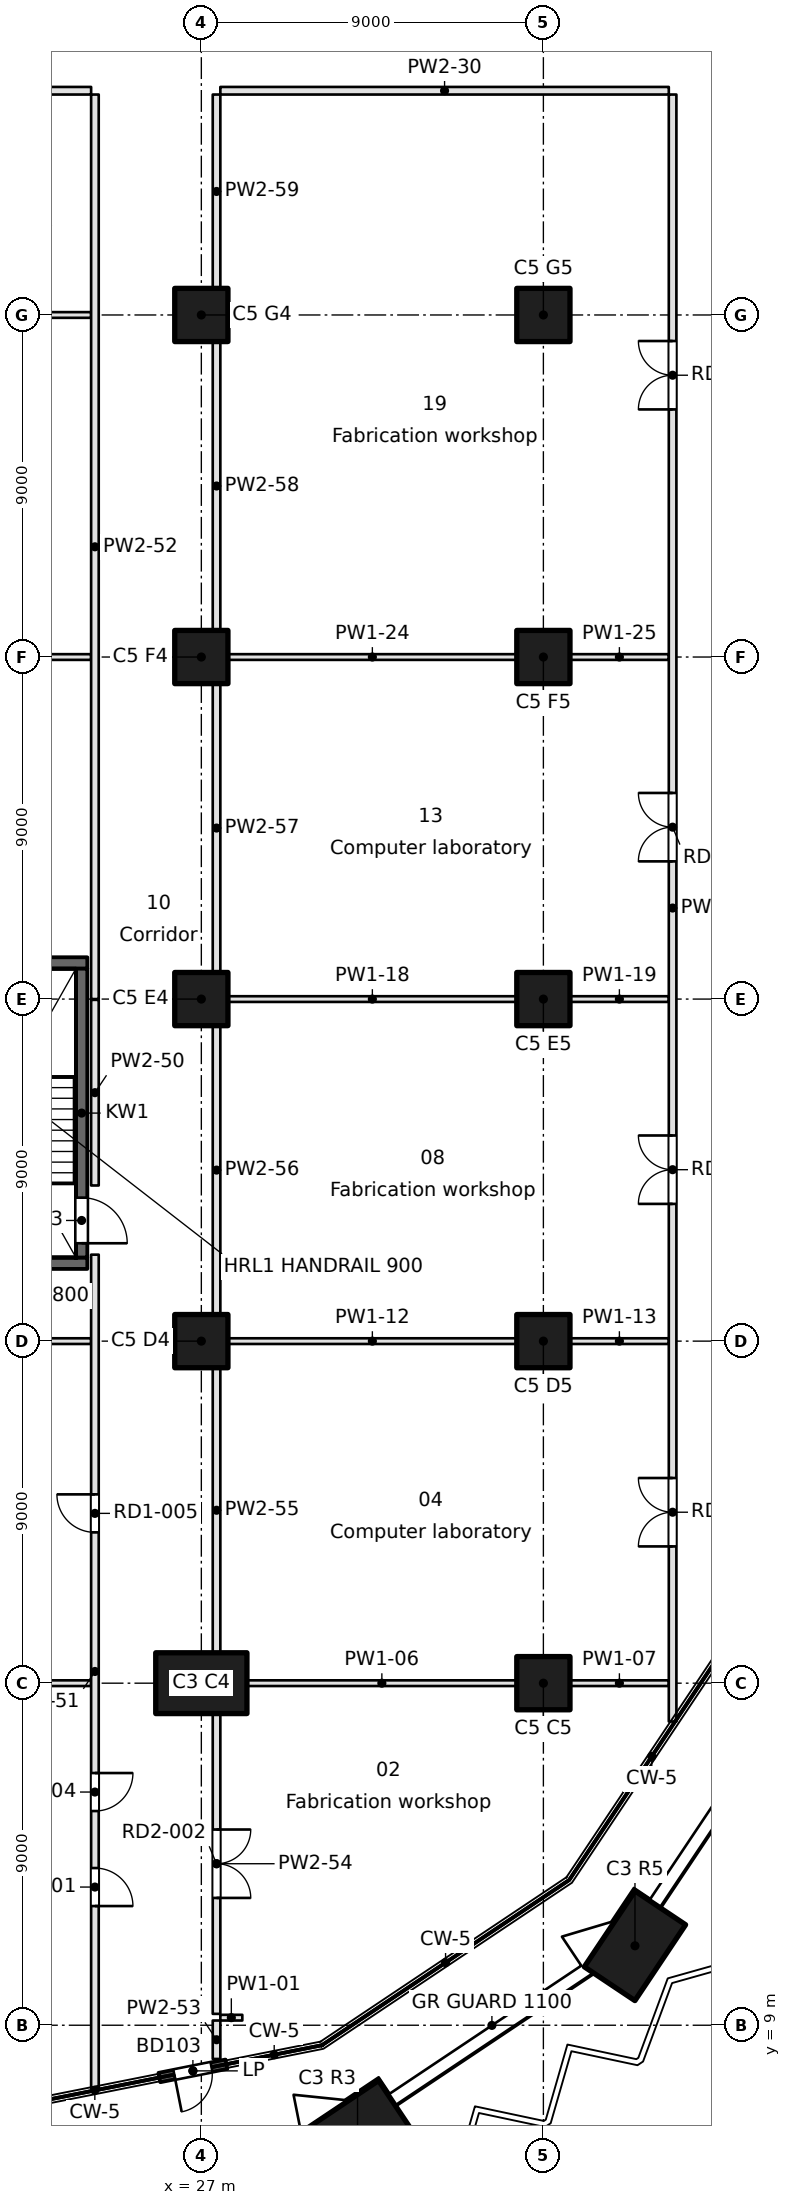
"""IFC4 building model, lengths in metres.
Left out: names, types, materials, properties, quantities, classifications, styles, units other than length and angle.
Written with IfcOpenShell. Run it as: python <this file> out.ifc"""

import sys

from ifc_helpers import new_model, si_unit, direction, frame, frame_2d, origin, origin_2d, place, context, subcontext, project, spatial, rectangle, extrude, element, fill, save


model = new_model("IFC4")
c1 = context("Model", 3, precision=1e-05, world=origin(), true_north=direction((0.0, 1.0)))
c2 = subcontext(c1, "Body", "Model", "MODEL_VIEW")
j1 = project(units=[si_unit("LENGTHUNIT", "METRE"), si_unit("PLANEANGLEUNIT", "RADIAN")], contexts=[c1])
p1 = place(None, origin())
s1 = spatial("IfcSite", under=j1, at=p1, CompositionType="ELEMENT")
p2 = place(p1, origin())
s2 = spatial("IfcBuilding", under=s1, at=p2, CompositionType="ELEMENT")
p3 = place(p2, frame((0.0, 0.0, 72.8)))
s3 = spatial("IfcBuildingStorey", under=s2, at=p3, CompositionType="ELEMENT", Elevation=72.8)
for number, where, z_axis, x_axis in (
    (1, (31.11, 6.213, 0.0), (0.0, 0.0, 1.0), (0.831, 0.556, 0.0)),
    (2, (38.41, 11.09, 0.0), (0.0, 0.0, 1.0), (0.556, 0.831, 0.0)),
    (3, (27.0, 18.0, 0.0), (0.0, 0.0, 1.0), (1.0, 0.0, 0.0)),
):
    element("IfcColumn", number, at=place(p3, frame(where, z_axis=z_axis, x_axis=x_axis)), inside=s3, PredefinedType="COLUMN", context=c2, shape_type="SweptSolid", body=[
        extrude(rectangle(XDim=2.4, YDim=1.6, at=origin_2d()), origin(), (0.0, 0.0, 1.0), 3.7),
    ])
for number, where, z_axis, x_axis in (
    (4, (27.0, 27.0, 0.0), (0.0, 0.0, 1.0), (1.0, 0.0, 0.0)),
    (5, (27.0, 36.0, 0.0), (0.0, 0.0, 1.0), (1.0, 0.0, 0.0)),
    (6, (27.0, 45.0, 0.0), (0.0, 0.0, 1.0), (1.0, 0.0, 0.0)),
    (7, (27.0, 54.0, 0.0), (0.0, 0.0, 1.0), (1.0, 0.0, 0.0)),
    (8, (36.0, 18.0, 0.0), (0.0, 0.0, 1.0), (1.0, 0.0, 0.0)),
    (9, (36.0, 27.0, 0.0), (0.0, 0.0, 1.0), (1.0, 0.0, 0.0)),
    (10, (36.0, 36.0, 0.0), (0.0, 0.0, 1.0), (1.0, 0.0, 0.0)),
    (11, (36.0, 45.0, 0.0), (0.0, 0.0, 1.0), (1.0, 0.0, 0.0)),
    (12, (36.0, 54.0, 0.0), (0.0, 0.0, 1.0), (1.0, 0.0, 0.0)),
):
    element("IfcColumn", number, at=place(p3, frame(where, z_axis=z_axis, x_axis=x_axis)), inside=s3, PredefinedType="COLUMN", context=c2, shape_type="SweptSolid", body=[
        extrude(rectangle(XDim=1.4, YDim=1.4, at=origin_2d()), origin(), (0.0, 0.0, 1.0), 3.7),
    ])
p4 = place(p3, frame((25.896, 7.624, 0.0), z_axis=(0.0, 0.0, 1.0), x_axis=(0.980793982239, 0.195046569833, 0.0)))
e13 = element("IfcWall", 13, at=p4, inside=s3, PredefinedType="SOLIDWALL", context=c2, shape_type="SweptSolid", body=[
    extrude(rectangle(XDim=1.8, YDim=0.25, at=frame_2d((0.9, 0.0))), origin(), (0.0, 0.0, 1.0), 3.3),
])
p5 = place(p4, frame((0.4, 0.0, 0.0)))
e14 = element("IfcOpeningElement", 14, at=p5, cuts=e13, PredefinedType="OPENING", context=c2, shape_type="SweptSolid", body=[
    extrude(rectangle(XDim=1.0, YDim=2.1, at=frame_2d((0.5, 1.05))), frame((0.0, 0.125, 0.0), z_axis=(0.0, -1.0, 0.0), x_axis=(1.0, 0.0, 0.0)), (0.0, 0.0, 1.0), 0.25),
])
for number, where, z_axis, x_axis in (
    (15, (19.1, 29.05, -0.4), (0.0, 0.0, 1.0), (1.0, 0.0, 0.0)),
    (16, (19.1, 36.95, -0.4), (0.0, 0.0, 1.0), (1.0, 0.0, 0.0)),
):
    element("IfcWall", number, at=place(p3, frame(where, z_axis=z_axis, x_axis=x_axis)), inside=s3, PredefinedType="SOLIDWALL", context=c2, shape_type="SweptSolid", body=[
        extrude(rectangle(XDim=4.9, YDim=0.3, at=frame_2d((2.45, 0.0))), origin(), (0.0, 0.0, 1.0), 3.7),
    ])
p6 = place(p3, frame((23.85, 29.2, -0.4), z_axis=(0.0, 0.0, 1.0), x_axis=(0.0, 1.0, 0.0)))
e17 = element("IfcWall", 17, at=p6, inside=s3, PredefinedType="SOLIDWALL", context=c2, shape_type="SweptSolid", body=[
    extrude(rectangle(XDim=7.6, YDim=0.3, at=frame_2d((3.8, 0.0))), origin(), (0.0, 0.0, 1.0), 3.7),
])
p7 = place(p6, frame((0.375, 0.0, 0.4)))
e18 = element("IfcOpeningElement", 18, at=p7, cuts=e17, PredefinedType="OPENING", context=c2, shape_type="SweptSolid", body=[
    extrude(rectangle(XDim=1.2, YDim=2.1, at=frame_2d((0.6, 1.05))), frame((0.0, 0.15, 0.0), z_axis=(0.0, -1.0, 0.0), x_axis=(1.0, 0.0, 0.0)), (0.0, 0.0, 1.0), 0.3),
])
p8 = place(p3, frame((27.5, 9.199, 0.0), z_axis=(0.0, 0.0, 1.0), x_axis=(1.0, 0.0, 0.0)))
e19 = element("IfcWall", 19, at=p8, inside=s3, PredefinedType="PARTITIONING", context=c2, shape_type="SweptSolid", body=[
    extrude(rectangle(XDim=0.578, YDim=0.15, at=frame_2d((0.289, 0.0))), origin(), (0.0, 0.0, 1.0), 3.3),
])
p9 = place(p3, frame((18.7, 18.0, 0.0), z_axis=(0.0, 0.0, 1.0), x_axis=(1.0, 0.0, 0.0)))
e20 = element("IfcWall", 20, at=p9, inside=s3, PredefinedType="PARTITIONING", context=c2, shape_type="SweptSolid", body=[
    extrude(rectangle(XDim=5.4, YDim=0.15, at=frame_2d((2.7, 0.0))), origin(), (0.0, 0.0, 1.0), 3.3),
])
p10 = place(p3, frame((28.2, 18.0, 0.0), z_axis=(0.0, 0.0, 1.0), x_axis=(1.0, 0.0, 0.0)))
e21 = element("IfcWall", 21, at=p10, inside=s3, PredefinedType="PARTITIONING", context=c2, shape_type="SweptSolid", body=[
    extrude(rectangle(XDim=7.1, YDim=0.15, at=frame_2d((3.55, 0.0))), origin(), (0.0, 0.0, 1.0), 3.3),
])
p11 = place(p3, frame((36.7, 18.0, 0.0), z_axis=(0.0, 0.0, 1.0), x_axis=(1.0, 0.0, 0.0)))
e22 = element("IfcWall", 22, at=p11, inside=s3, PredefinedType="PARTITIONING", context=c2, shape_type="SweptSolid", body=[
    extrude(rectangle(XDim=2.6, YDim=0.15, at=frame_2d((1.3, 0.0))), origin(), (0.0, 0.0, 1.0), 3.3),
])
p12 = place(p3, frame((18.7, 27.0, 0.0), z_axis=(0.0, 0.0, 1.0), x_axis=(1.0, 0.0, 0.0)))
e23 = element("IfcWall", 23, at=p12, inside=s3, PredefinedType="PARTITIONING", context=c2, shape_type="SweptSolid", body=[
    extrude(rectangle(XDim=5.4, YDim=0.15, at=frame_2d((2.7, 0.0))), origin(), (0.0, 0.0, 1.0), 3.3),
])
p13 = place(p3, frame((27.7, 27.0, 0.0), z_axis=(0.0, 0.0, 1.0), x_axis=(1.0, 0.0, 0.0)))
e24 = element("IfcWall", 24, at=p13, inside=s3, PredefinedType="PARTITIONING", context=c2, shape_type="SweptSolid", body=[
    extrude(rectangle(XDim=7.6, YDim=0.15, at=frame_2d((3.8, 0.0))), origin(), (0.0, 0.0, 1.0), 3.3),
])
p14 = place(p3, frame((36.7, 27.0, 0.0), z_axis=(0.0, 0.0, 1.0), x_axis=(1.0, 0.0, 0.0)))
e25 = element("IfcWall", 25, at=p14, inside=s3, PredefinedType="PARTITIONING", context=c2, shape_type="SweptSolid", body=[
    extrude(rectangle(XDim=2.6, YDim=0.15, at=frame_2d((1.3, 0.0))), origin(), (0.0, 0.0, 1.0), 3.3),
])
p15 = place(p3, frame((27.7, 36.0, 0.0), z_axis=(0.0, 0.0, 1.0), x_axis=(1.0, 0.0, 0.0)))
e26 = element("IfcWall", 26, at=p15, inside=s3, PredefinedType="PARTITIONING", context=c2, shape_type="SweptSolid", body=[
    extrude(rectangle(XDim=7.6, YDim=0.15, at=frame_2d((3.8, 0.0))), origin(), (0.0, 0.0, 1.0), 3.3),
])
p16 = place(p3, frame((36.7, 36.0, 0.0), z_axis=(0.0, 0.0, 1.0), x_axis=(1.0, 0.0, 0.0)))
e27 = element("IfcWall", 27, at=p16, inside=s3, PredefinedType="PARTITIONING", context=c2, shape_type="SweptSolid", body=[
    extrude(rectangle(XDim=2.6, YDim=0.15, at=frame_2d((1.3, 0.0))), origin(), (0.0, 0.0, 1.0), 3.3),
])
p17 = place(p3, frame((18.7, 45.0, 0.0), z_axis=(0.0, 0.0, 1.0), x_axis=(1.0, 0.0, 0.0)))
e28 = element("IfcWall", 28, at=p17, inside=s3, PredefinedType="PARTITIONING", context=c2, shape_type="SweptSolid", body=[
    extrude(rectangle(XDim=5.4, YDim=0.15, at=frame_2d((2.7, 0.0))), origin(), (0.0, 0.0, 1.0), 3.3),
])
p18 = place(p3, frame((27.7, 45.0, 0.0), z_axis=(0.0, 0.0, 1.0), x_axis=(1.0, 0.0, 0.0)))
e29 = element("IfcWall", 29, at=p18, inside=s3, PredefinedType="PARTITIONING", context=c2, shape_type="SweptSolid", body=[
    extrude(rectangle(XDim=7.6, YDim=0.15, at=frame_2d((3.8, 0.0))), origin(), (0.0, 0.0, 1.0), 3.3),
])
p19 = place(p3, frame((36.7, 45.0, 0.0), z_axis=(0.0, 0.0, 1.0), x_axis=(1.0, 0.0, 0.0)))
e30 = element("IfcWall", 30, at=p19, inside=s3, PredefinedType="PARTITIONING", context=c2, shape_type="SweptSolid", body=[
    extrude(rectangle(XDim=2.6, YDim=0.15, at=frame_2d((1.3, 0.0))), origin(), (0.0, 0.0, 1.0), 3.3),
])
p20 = place(p3, frame((18.7, 54.0, 0.0), z_axis=(0.0, 0.0, 1.0), x_axis=(1.0, 0.0, 0.0)))
e31 = element("IfcWall", 31, at=p20, inside=s3, PredefinedType="PARTITIONING", context=c2, shape_type="SweptSolid", body=[
    extrude(rectangle(XDim=5.4, YDim=0.15, at=frame_2d((2.7, 0.0))), origin(), (0.0, 0.0, 1.0), 3.3),
])
p21 = place(p3, frame((24.1, 59.9, 0.0), z_axis=(0.0, 0.0, 1.0), x_axis=(-1.0, 0.0, 0.0)))
e32 = element("IfcWall", 32, at=p21, inside=s3, PredefinedType="PARTITIONING", context=c2, shape_type="SweptSolid", body=[
    extrude(rectangle(XDim=8.2, YDim=0.2, at=frame_2d((4.1, 0.0))), origin(), (0.0, 0.0, 1.0), 3.3),
])
p22 = place(p21, frame((3.6, 0.0, 0.0)))
e33 = element("IfcOpeningElement", 33, at=p22, cuts=e32, PredefinedType="OPENING", context=c2, shape_type="SweptSolid", body=[
    extrude(rectangle(XDim=1.0, YDim=2.1, at=frame_2d((0.5, 1.05))), frame((0.0, 0.1, 0.0), z_axis=(0.0, -1.0, 0.0), x_axis=(1.0, 0.0, 0.0)), (0.0, 0.0, 1.0), 0.2),
])
p23 = place(p3, frame((39.3, 59.9, 0.0), z_axis=(0.0, 0.0, 1.0), x_axis=(-1.0, 0.0, 0.0)))
e34 = element("IfcWall", 34, at=p23, inside=s3, PredefinedType="PARTITIONING", context=c2, shape_type="SweptSolid", body=[
    extrude(rectangle(XDim=11.8, YDim=0.2, at=frame_2d((5.9, 0.0))), origin(), (0.0, 0.0, 1.0), 3.3),
])
p24 = place(p3, frame((24.2, 31.095, 0.0), z_axis=(0.0, 0.0, 1.0), x_axis=(0.0, 1.0, 0.0)))
e35 = element("IfcWall", 35, at=p24, inside=s3, PredefinedType="PARTITIONING", context=c2, shape_type="SweptSolid", body=[
    extrude(rectangle(XDim=4.884, YDim=0.2, at=frame_2d((2.442, 0.0))), origin(), (0.0, 0.0, 1.0), 3.3),
])
p25 = place(p3, frame((24.2, 7.341, 0.0), z_axis=(0.0, 0.0, 1.0), x_axis=(0.0, 1.0, 0.0)))
e36 = element("IfcWall", 36, at=p25, inside=s3, PredefinedType="PARTITIONING", context=c2, shape_type="SweptSolid", body=[
    extrude(rectangle(XDim=21.934, YDim=0.2, at=frame_2d((10.967, 0.0))), origin(), (0.0, 0.0, 1.0), 3.3),
])
p26 = place(p25, frame((4.794, 0.0, 0.0)))
e37 = element("IfcOpeningElement", 37, at=p26, cuts=e36, PredefinedType="OPENING", context=c2, shape_type="SweptSolid", body=[
    extrude(rectangle(XDim=1.0, YDim=2.1, at=frame_2d((0.5, 1.05))), frame((0.0, 0.1, 0.0), z_axis=(0.0, -1.0, 0.0), x_axis=(1.0, 0.0, 0.0)), (0.0, 0.0, 1.0), 0.2),
])
p27 = place(p25, frame((7.294, 0.0, 0.0)))
e38 = element("IfcOpeningElement", 38, at=p27, cuts=e36, PredefinedType="OPENING", context=c2, shape_type="SweptSolid", body=[
    extrude(rectangle(XDim=1.0, YDim=2.1, at=frame_2d((0.5, 1.05))), frame((0.0, 0.1, 0.0), z_axis=(0.0, -1.0, 0.0), x_axis=(1.0, 0.0, 0.0)), (0.0, 0.0, 1.0), 0.2),
])
p28 = place(p25, frame((14.627, 0.0, 0.0)))
e39 = element("IfcOpeningElement", 39, at=p28, cuts=e36, PredefinedType="OPENING", context=c2, shape_type="SweptSolid", body=[
    extrude(rectangle(XDim=1.0, YDim=2.1, at=frame_2d((0.5, 1.05))), frame((0.0, 0.1, 0.0), z_axis=(0.0, -1.0, 0.0), x_axis=(1.0, 0.0, 0.0)), (0.0, 0.0, 1.0), 0.2),
])
p29 = place(p3, frame((24.2, 36.0, 0.0), z_axis=(0.0, 0.0, 1.0), x_axis=(0.0, 1.0, 0.0)))
e40 = element("IfcWall", 40, at=p29, inside=s3, PredefinedType="PARTITIONING", context=c2, shape_type="SweptSolid", body=[
    extrude(rectangle(XDim=23.8, YDim=0.2, at=frame_2d((11.9, 0.0))), origin(), (0.0, 0.0, 1.0), 3.3),
])
p30 = place(p3, frame((27.4, 9.124, 0.0), z_axis=(0.0, 0.0, 1.0), x_axis=(0.0, -1.0, 0.0)))
e41 = element("IfcWall", 41, at=p30, inside=s3, PredefinedType="PARTITIONING", context=c2, shape_type="SweptSolid", body=[
    extrude(rectangle(XDim=1.011, YDim=0.2, at=frame_2d((0.506, 0.0))), origin(), (0.0, 0.0, 1.0), 3.3),
])
p31 = place(p3, frame((27.4, 17.2, 0.0), z_axis=(0.0, 0.0, 1.0), x_axis=(0.0, -1.0, 0.0)))
e42 = element("IfcWall", 42, at=p31, inside=s3, PredefinedType="PARTITIONING", context=c2, shape_type="SweptSolid", body=[
    extrude(rectangle(XDim=7.901, YDim=0.2, at=frame_2d((3.95, 0.0))), origin(), (0.0, 0.0, 1.0), 3.3),
])
p32 = place(p31, frame((3.051, 0.0, 0.0)))
e43 = element("IfcOpeningElement", 43, at=p32, cuts=e42, PredefinedType="OPENING", context=c2, shape_type="SweptSolid", body=[
    extrude(rectangle(XDim=1.8, YDim=2.1, at=frame_2d((0.9, 1.05))), frame((0.0, 0.1, 0.0), z_axis=(0.0, -1.0, 0.0), x_axis=(1.0, 0.0, 0.0)), (0.0, 0.0, 1.0), 0.2),
])
p33 = place(p3, frame((27.4, 26.3, 0.0), z_axis=(0.0, 0.0, 1.0), x_axis=(0.0, -1.0, 0.0)))
e44 = element("IfcWall", 44, at=p33, inside=s3, PredefinedType="PARTITIONING", context=c2, shape_type="SweptSolid", body=[
    extrude(rectangle(XDim=7.5, YDim=0.2, at=frame_2d((3.75, 0.0))), origin(), (0.0, 0.0, 1.0), 3.3),
])
for number, where, z_axis, x_axis in (
    (45, (27.4, 35.3, 0.0), (0.0, 0.0, 1.0), (0.0, -1.0, 0.0)),
    (46, (27.4, 44.3, 0.0), (0.0, 0.0, 1.0), (0.0, -1.0, 0.0)),
    (47, (27.4, 53.3, 0.0), (0.0, 0.0, 1.0), (0.0, -1.0, 0.0)),
):
    element("IfcWall", number, at=place(p3, frame(where, z_axis=z_axis, x_axis=x_axis)), inside=s3, PredefinedType="PARTITIONING", context=c2, shape_type="SweptSolid", body=[
        extrude(rectangle(XDim=7.6, YDim=0.2, at=frame_2d((3.8, 0.0))), origin(), (0.0, 0.0, 1.0), 3.3),
    ])
p34 = place(p3, frame((27.4, 59.8, 0.0), z_axis=(0.0, 0.0, 1.0), x_axis=(0.0, -1.0, 0.0)))
e48 = element("IfcWall", 48, at=p34, inside=s3, PredefinedType="PARTITIONING", context=c2, shape_type="SweptSolid", body=[
    extrude(rectangle(XDim=5.1, YDim=0.2, at=frame_2d((2.55, 0.0))), origin(), (0.0, 0.0, 1.0), 3.3),
])
p35 = place(p3, frame((39.4, 16.991, 0.0), z_axis=(0.0, 0.0, 1.0), x_axis=(0.0, 1.0, 0.0)))
e49 = element("IfcWall", 49, at=p35, inside=s3, PredefinedType="PARTITIONING", context=c2, shape_type="SweptSolid", body=[
    extrude(rectangle(XDim=42.809, YDim=0.2, at=frame_2d((21.405, 0.0))), origin(), (0.0, 0.0, 1.0), 3.3),
])
p36 = place(p35, frame((4.608, 0.0, 0.0)))
e50 = element("IfcOpeningElement", 50, at=p36, cuts=e49, PredefinedType="OPENING", context=c2, shape_type="SweptSolid", body=[
    extrude(rectangle(XDim=1.8, YDim=2.1, at=frame_2d((0.9, 1.05))), frame((0.0, 0.1, 0.0), z_axis=(0.0, -1.0, 0.0), x_axis=(1.0, 0.0, 0.0)), (0.0, 0.0, 1.0), 0.2),
])
p37 = place(p35, frame((13.62, 0.0, 0.0)))
e51 = element("IfcOpeningElement", 51, at=p37, cuts=e49, PredefinedType="OPENING", context=c2, shape_type="SweptSolid", body=[
    extrude(rectangle(XDim=1.8, YDim=2.1, at=frame_2d((0.9, 1.05))), frame((0.0, 0.1, 0.0), z_axis=(0.0, -1.0, 0.0), x_axis=(1.0, 0.0, 0.0)), (0.0, 0.0, 1.0), 0.2),
])
p38 = place(p35, frame((22.633, 0.0, 0.0)))
e52 = element("IfcOpeningElement", 52, at=p38, cuts=e49, PredefinedType="OPENING", context=c2, shape_type="SweptSolid", body=[
    extrude(rectangle(XDim=1.8, YDim=2.1, at=frame_2d((0.9, 1.05))), frame((0.0, 0.1, 0.0), z_axis=(0.0, -1.0, 0.0), x_axis=(1.0, 0.0, 0.0)), (0.0, 0.0, 1.0), 0.2),
])
p39 = place(p35, frame((34.524, 0.0, 0.0)))
e53 = element("IfcOpeningElement", 53, at=p39, cuts=e49, PredefinedType="OPENING", context=c2, shape_type="SweptSolid", body=[
    extrude(rectangle(XDim=1.8, YDim=2.1, at=frame_2d((0.9, 1.05))), frame((0.0, 0.1, 0.0), z_axis=(0.0, -1.0, 0.0), x_axis=(1.0, 0.0, 0.0)), (0.0, 0.0, 1.0), 0.2),
])
p40 = place(p5, frame((1.0, 0.0, 0.0), z_axis=(0.0, 0.0, 1.0), x_axis=(-1.0, 0.0, 0.0)))
e54 = element("IfcDoor", 54, at=p40, inside=s3, OperationType="SINGLE_SWING_RIGHT", PredefinedType="DOOR", context=c2, shape_type="SweptSolid", body=[
    extrude(rectangle(XDim=1.0, YDim=2.1, at=frame_2d((0.5, 1.05))), frame((0.0, 0.025, 0.0), z_axis=(0.0, -1.0, 0.0), x_axis=(1.0, 0.0, 0.0)), (0.0, 0.0, 1.0), 0.05),
])
fill(e14, e54)
p41 = place(p7, frame((1.2, 0.0, 0.0), z_axis=(0.0, 0.0, 1.0), x_axis=(-1.0, 0.0, 0.0)))
e55 = element("IfcDoor", 55, at=p41, inside=s3, OperationType="SINGLE_SWING_RIGHT", PredefinedType="DOOR", context=c2, shape_type="SweptSolid", body=[
    extrude(rectangle(XDim=1.2, YDim=2.1, at=frame_2d((0.6, 1.05))), frame((0.0, 0.025, 0.0), z_axis=(0.0, -1.0, 0.0), x_axis=(1.0, 0.0, 0.0)), (0.0, 0.0, 1.0), 0.05),
])
fill(e18, e55)
p42 = place(p26, frame((1.0, 0.0, 0.0), z_axis=(0.0, 0.0, 1.0), x_axis=(-1.0, 0.0, 0.0)))
e56 = element("IfcDoor", 56, at=p42, inside=s3, OperationType="SINGLE_SWING_RIGHT", PredefinedType="DOOR", context=c2, shape_type="SweptSolid", body=[
    extrude(rectangle(XDim=1.0, YDim=2.1, at=frame_2d((0.5, 1.05))), frame((0.0, 0.025, 0.0), z_axis=(0.0, -1.0, 0.0), x_axis=(1.0, 0.0, 0.0)), (0.0, 0.0, 1.0), 0.05),
])
fill(e37, e56)
p43 = place(p32, origin())
e57 = element("IfcDoor", 57, at=p43, inside=s3, OperationType="DOUBLE_DOOR_SINGLE_SWING", PredefinedType="DOOR", context=c2, shape_type="SweptSolid", body=[
    extrude(rectangle(XDim=1.8, YDim=2.1, at=frame_2d((0.9, 1.05))), frame((0.0, 0.025, 0.0), z_axis=(0.0, -1.0, 0.0), x_axis=(1.0, 0.0, 0.0)), (0.0, 0.0, 1.0), 0.05),
])
fill(e43, e57)
p44 = place(p27, frame((1.0, 0.0, 0.0), z_axis=(0.0, 0.0, 1.0), x_axis=(-1.0, 0.0, 0.0)))
e58 = element("IfcDoor", 58, at=p44, inside=s3, OperationType="SINGLE_SWING_LEFT", PredefinedType="DOOR", context=c2, shape_type="SweptSolid", body=[
    extrude(rectangle(XDim=1.0, YDim=2.1, at=frame_2d((0.5, 1.05))), frame((0.0, 0.025, 0.0), z_axis=(0.0, -1.0, 0.0), x_axis=(1.0, 0.0, 0.0)), (0.0, 0.0, 1.0), 0.05),
])
fill(e38, e58)
p45 = place(p28, origin())
e59 = element("IfcDoor", 59, at=p45, inside=s3, OperationType="SINGLE_SWING_RIGHT", PredefinedType="DOOR", context=c2, shape_type="SweptSolid", body=[
    extrude(rectangle(XDim=1.0, YDim=2.1, at=frame_2d((0.5, 1.05))), frame((0.0, 0.025, 0.0), z_axis=(0.0, -1.0, 0.0), x_axis=(1.0, 0.0, 0.0)), (0.0, 0.0, 1.0), 0.05),
])
fill(e39, e59)
p46 = place(p36, origin())
e60 = element("IfcDoor", 60, at=p46, inside=s3, OperationType="DOUBLE_DOOR_SINGLE_SWING", PredefinedType="DOOR", context=c2, shape_type="SweptSolid", body=[
    extrude(rectangle(XDim=1.8, YDim=2.1, at=frame_2d((0.9, 1.05))), frame((0.0, 0.025, 0.0), z_axis=(0.0, -1.0, 0.0), x_axis=(1.0, 0.0, 0.0)), (0.0, 0.0, 1.0), 0.05),
])
fill(e50, e60)
p47 = place(p37, origin())
e61 = element("IfcDoor", 61, at=p47, inside=s3, OperationType="DOUBLE_DOOR_SINGLE_SWING", PredefinedType="DOOR", context=c2, shape_type="SweptSolid", body=[
    extrude(rectangle(XDim=1.8, YDim=2.1, at=frame_2d((0.9, 1.05))), frame((0.0, 0.025, 0.0), z_axis=(0.0, -1.0, 0.0), x_axis=(1.0, 0.0, 0.0)), (0.0, 0.0, 1.0), 0.05),
])
fill(e51, e61)
p48 = place(p38, origin())
e62 = element("IfcDoor", 62, at=p48, inside=s3, OperationType="DOUBLE_DOOR_SINGLE_SWING", PredefinedType="DOOR", context=c2, shape_type="SweptSolid", body=[
    extrude(rectangle(XDim=1.8, YDim=2.1, at=frame_2d((0.9, 1.05))), frame((0.0, 0.025, 0.0), z_axis=(0.0, -1.0, 0.0), x_axis=(1.0, 0.0, 0.0)), (0.0, 0.0, 1.0), 0.05),
])
fill(e52, e62)
p49 = place(p39, origin())
e63 = element("IfcDoor", 63, at=p49, inside=s3, OperationType="DOUBLE_DOOR_SINGLE_SWING", PredefinedType="DOOR", context=c2, shape_type="SweptSolid", body=[
    extrude(rectangle(XDim=1.8, YDim=2.1, at=frame_2d((0.9, 1.05))), frame((0.0, 0.025, 0.0), z_axis=(0.0, -1.0, 0.0), x_axis=(1.0, 0.0, 0.0)), (0.0, 0.0, 1.0), 0.05),
])
fill(e53, e63)
save(model, sys.argv[1])
